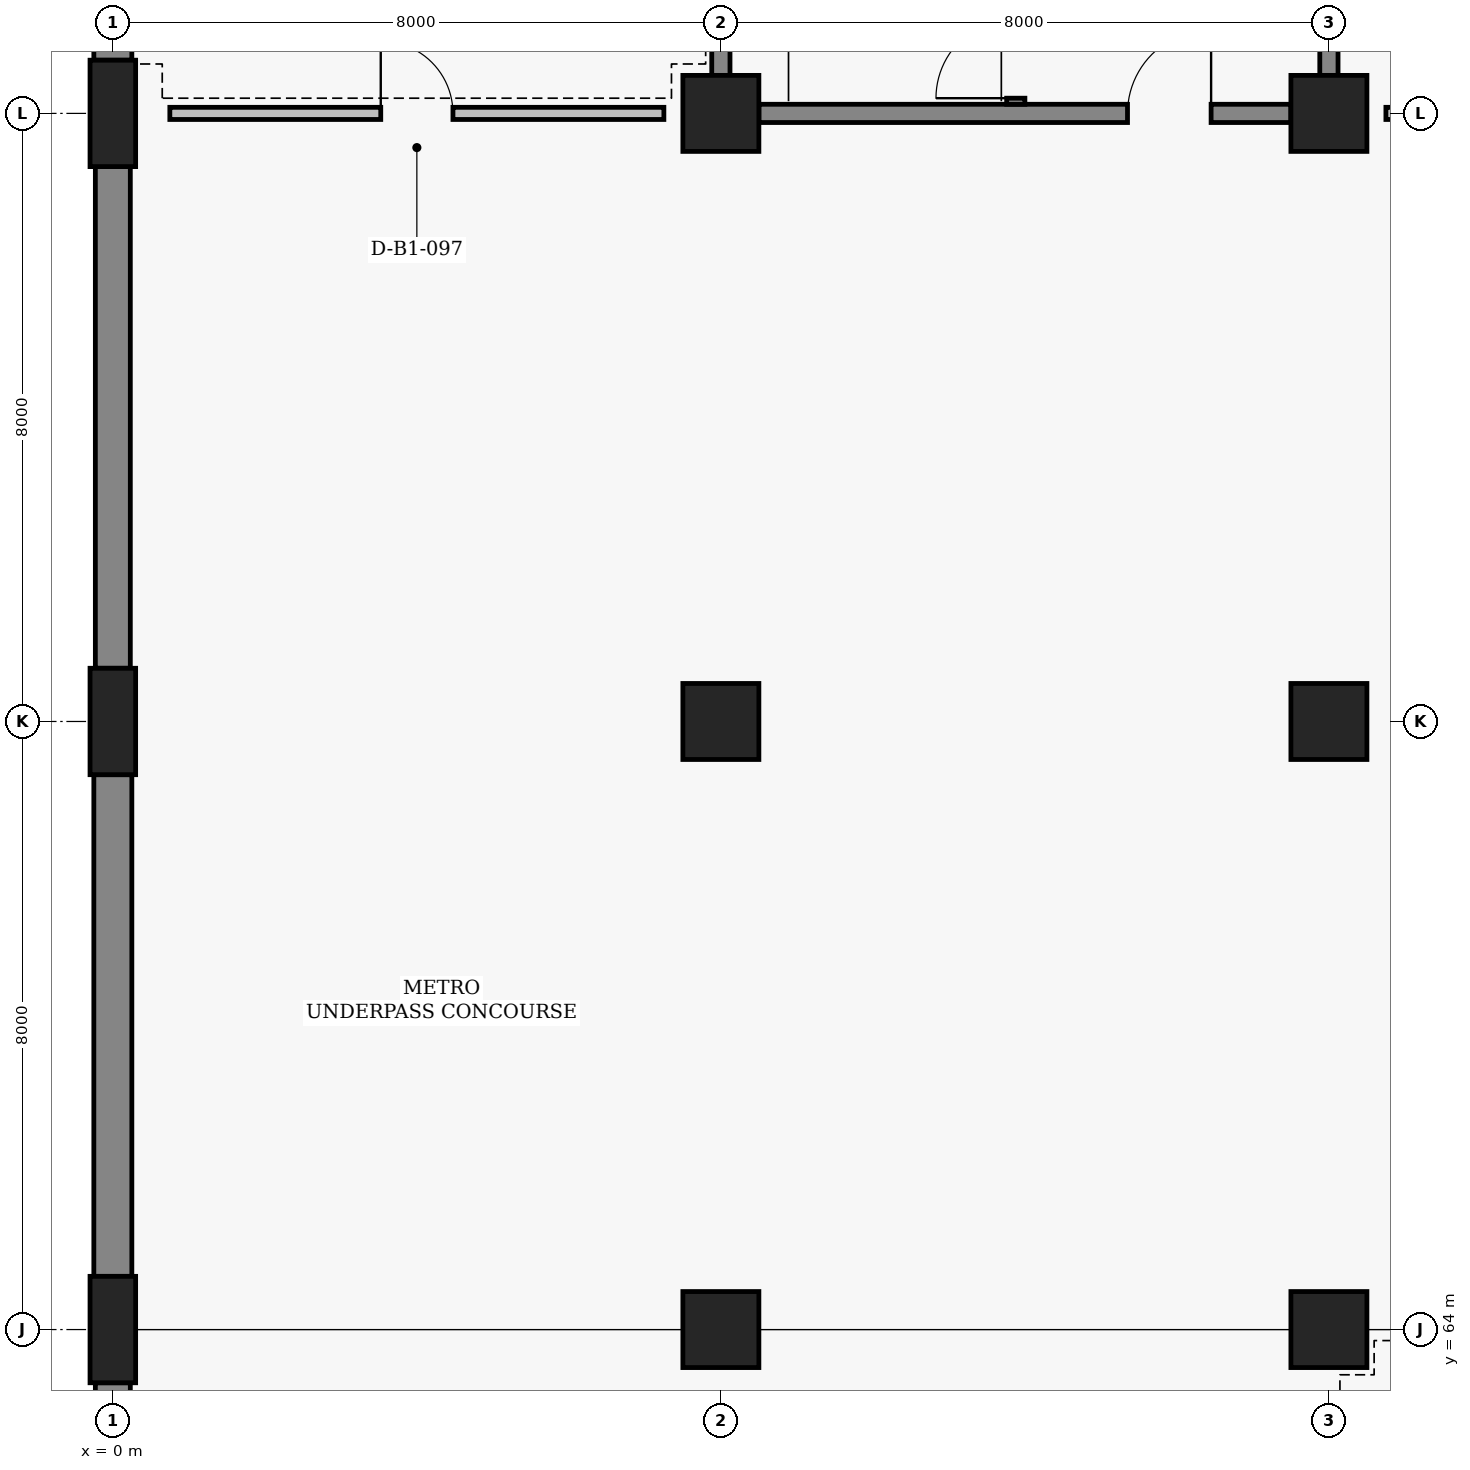
"""IFC4 building model, lengths in metres.
Left out: names, types, materials, properties, quantities, classifications, styles, units other than length and angle.
Written with IfcOpenShell. Run it as: python <this file> out.ifc"""

import sys

from ifc_helpers import new_model, si_unit, direction, frame, frame_2d, origin, origin_2d, place, context, subcontext, project, spatial, rectangle, circle, extrude, element, fill, save


model = new_model("IFC4")
c1 = context("Model", 3, precision=1e-05, world=origin(), true_north=direction((0.0, 1.0)))
c2 = subcontext(c1, "Body", "Model", "MODEL_VIEW")
j1 = project(units=[si_unit("LENGTHUNIT", "METRE"), si_unit("PLANEANGLEUNIT", "RADIAN")], contexts=[c1])
p1 = place(None, origin())
s1 = spatial("IfcSite", under=j1, at=p1, CompositionType="ELEMENT")
p2 = place(p1, origin())
s2 = spatial("IfcBuilding", under=s1, at=p2, CompositionType="ELEMENT")
p3 = place(p2, frame((0.0, 0.0, -5.4)))
s3 = spatial("IfcBuildingStorey", under=s2, at=p3, CompositionType="ELEMENT", Elevation=-5.4)
for number, where, z_axis, x_axis in (
    (1, (0.0, 64.0, 0.0), (0.0, 0.0, 1.0), (1.0, 0.0, 0.0)),
    (2, (0.0, 72.0, 0.0), (0.0, 0.0, 1.0), (1.0, 0.0, 0.0)),
    (3, (0.0, 80.0, 0.0), (0.0, 0.0, 1.0), (1.0, 0.0, 0.0)),
):
    element("IfcColumn", number, at=place(p3, frame(where, z_axis=z_axis, x_axis=x_axis)), inside=s3, PredefinedType="PILASTER", context=c2, shape_type="SweptSolid", body=[
        extrude(rectangle(XDim=0.6, YDim=1.4, at=origin_2d()), origin(), (0.0, 0.0, 1.0), 5.4),
    ])
for number, where, z_axis, x_axis in (
    (4, (8.0, 64.0, 0.0), (0.0, 0.0, 1.0), (1.0, 0.0, 0.0)),
    (5, (8.0, 72.0, 0.0), (0.0, 0.0, 1.0), (1.0, 0.0, 0.0)),
    (6, (8.0, 80.0, 0.0), (0.0, 0.0, 1.0), (1.0, 0.0, 0.0)),
    (7, (16.0, 64.0, 0.0), (0.0, 0.0, 1.0), (1.0, 0.0, 0.0)),
    (8, (16.0, 72.0, 0.0), (0.0, 0.0, 1.0), (1.0, 0.0, 0.0)),
    (9, (16.0, 80.0, 0.0), (0.0, 0.0, 1.0), (1.0, 0.0, 0.0)),
):
    element("IfcColumn", number, at=place(p3, frame(where, z_axis=z_axis, x_axis=x_axis)), inside=s3, PredefinedType="COLUMN", context=c2, shape_type="SweptSolid", body=[
        extrude(circle(Radius=0.5, at=origin_2d()), origin(), (0.0, 0.0, 1.0), 5.4),
    ])
p4 = place(p3, frame((0.0, 56.7, 0.0), z_axis=(0.0, 0.0, 1.0), x_axis=(0.0, 1.0, 0.0)))
e10 = element("IfcWall", 10, at=p4, inside=s3, PredefinedType="STANDARD", context=c2, shape_type="SweptSolid", body=[
    extrude(rectangle(XDim=6.6, YDim=0.46, at=frame_2d((3.3, 0.0))), origin(), (0.0, 0.0, 1.0), 3.69),
])
p5 = place(p3, frame((0.0, 64.7, 0.0), z_axis=(0.0, 0.0, 1.0), x_axis=(0.0, 1.0, 0.0)))
e11 = element("IfcWall", 11, at=p5, inside=s3, PredefinedType="STANDARD", context=c2, shape_type="SweptSolid", body=[
    extrude(rectangle(XDim=6.6, YDim=0.5, at=frame_2d((3.3, 0.0))), origin(), (0.0, 0.0, 1.0), 4.24),
])
p6 = place(p3, frame((0.0, 72.7, 0.0), z_axis=(0.0, 0.0, 1.0), x_axis=(0.0, 1.0, 0.0)))
e12 = element("IfcWall", 12, at=p6, inside=s3, PredefinedType="STANDARD", context=c2, shape_type="SweptSolid", body=[
    extrude(rectangle(XDim=6.6, YDim=0.46, at=frame_2d((3.3, 0.0))), origin(), (0.0, 0.0, 1.0), 4.24),
])
p7 = place(p3, frame((0.0, 80.7, 0.0), z_axis=(0.0, 0.0, 1.0), x_axis=(0.0, 1.0, 0.0)))
e13 = element("IfcWall", 13, at=p7, inside=s3, PredefinedType="STANDARD", context=c2, shape_type="SweptSolid", body=[
    extrude(rectangle(XDim=6.6, YDim=0.5, at=frame_2d((3.3, 0.0))), origin(), (0.0, 0.0, 1.0), 4.24),
])
p8 = place(p3, frame((8.5, 80.0, 0.0), z_axis=(0.0, 0.0, 1.0), x_axis=(1.0, 0.0, 0.0)))
e14 = element("IfcWall", 14, at=p8, inside=s3, PredefinedType="SHEAR", context=c2, shape_type="SweptSolid", body=[
    extrude(rectangle(XDim=7.0, YDim=0.24, at=frame_2d((3.5, 0.0))), origin(), (0.0, 0.0, 1.0), 4.39),
])
p9 = place(p8, frame((4.85, 0.0, 0.0)))
e15 = element("IfcOpeningElement", 15, at=p9, cuts=e14, PredefinedType="OPENING", context=c2, shape_type="SweptSolid", body=[
    extrude(rectangle(XDim=1.1, YDim=2.2, at=frame_2d((0.55, 1.1))), frame((0.0, 0.13, 0.0), z_axis=(0.0, -1.0, 0.0), x_axis=(1.0, 0.0, 0.0)), (0.0, 0.0, 1.0), 0.26),
])
for number, where, z_axis, x_axis in (
    (16, (8.0, 80.5, 0.0), (0.0, 0.0, 1.0), (0.0, 1.0, 0.0)),
    (17, (16.0, 80.5, 0.0), (0.0, 0.0, 1.0), (0.0, 1.0, 0.0)),
):
    element("IfcWall", number, at=place(p3, frame(where, z_axis=z_axis, x_axis=x_axis)), inside=s3, PredefinedType="SHEAR", context=c2, shape_type="SweptSolid", body=[
        extrude(rectangle(XDim=7.0, YDim=0.24, at=frame_2d((3.5, 0.0))), origin(), (0.0, 0.0, 1.0), 4.39),
    ])
p10 = place(p3, frame((11.88, 80.12, 0.0), z_axis=(0.0, 0.0, 1.0), x_axis=(0.0, 1.0, 0.0)))
e18 = element("IfcWall", 18, at=p10, inside=s3, PredefinedType="SHEAR", context=c2, shape_type="SweptSolid", body=[
    extrude(rectangle(XDim=7.76, YDim=0.24, at=frame_2d((3.88, 0.0))), origin(), (0.0, 0.0, 1.0), 4.59),
])
p11 = place(p10, frame((0.08, 0.0, 0.0)))
e19 = element("IfcOpeningElement", 19, at=p11, cuts=e18, PredefinedType="OPENING", context=c2, shape_type="SweptSolid", body=[
    extrude(rectangle(XDim=1.05, YDim=2.15, at=frame_2d((0.525, 1.075))), frame((0.0, 0.13, 0.0), z_axis=(0.0, -1.0, 0.0), x_axis=(1.0, 0.0, 0.0)), (0.0, 0.0, 1.0), 0.26),
])
p12 = place(p3, frame((0.75, 80.0, 0.0), z_axis=(0.0, 0.0, 1.0), x_axis=(1.0, 0.0, 0.0)))
e20 = element("IfcWall", 20, at=p12, inside=s3, PredefinedType="PARTITIONING", context=c2, shape_type="SweptSolid", body=[
    extrude(rectangle(XDim=6.5, YDim=0.16, at=frame_2d((3.25, 0.0))), origin(), (0.0, 0.0, 1.0), 4.49),
])
p13 = place(p12, frame((2.775, 0.0, 0.0)))
e21 = element("IfcOpeningElement", 21, at=p13, cuts=e20, PredefinedType="OPENING", context=c2, shape_type="SweptSolid", body=[
    extrude(rectangle(XDim=0.95, YDim=2.1, at=frame_2d((0.475, 1.05))), frame((0.0, 0.09, 0.0), z_axis=(0.0, -1.0, 0.0), x_axis=(1.0, 0.0, 0.0)), (0.0, 0.0, 1.0), 0.18),
])
p14 = place(p3, frame((16.75, 80.0, 0.0), z_axis=(0.0, 0.0, 1.0), x_axis=(1.0, 0.0, 0.0)))
e22 = element("IfcWall", 22, at=p14, inside=s3, PredefinedType="PARTITIONING", context=c2, shape_type="SweptSolid", body=[
    extrude(rectangle(XDim=6.5, YDim=0.16, at=frame_2d((3.25, 0.0))), origin(), (0.0, 0.0, 1.0), 4.49),
])
p15 = place(p14, frame((2.775, 0.0, 0.0)))
e23 = element("IfcOpeningElement", 23, at=p15, cuts=e22, PredefinedType="OPENING", context=c2, shape_type="SweptSolid", body=[
    extrude(rectangle(XDim=0.95, YDim=2.1, at=frame_2d((0.475, 1.05))), frame((0.0, 0.09, 0.0), z_axis=(0.0, -1.0, 0.0), x_axis=(1.0, 0.0, 0.0)), (0.0, 0.0, 1.0), 0.18),
])
p16 = place(p9, origin())
e24 = element("IfcDoor", 24, at=p16, inside=s3, OperationType="SINGLE_SWING_RIGHT", PredefinedType="DOOR", context=c2, shape_type="SweptSolid", body=[
    extrude(rectangle(XDim=1.1, YDim=2.2, at=frame_2d((0.55, 1.1))), frame((0.0, 0.025, 0.0), z_axis=(0.0, -1.0, 0.0), x_axis=(1.0, 0.0, 0.0)), (0.0, 0.0, 1.0), 0.05),
])
fill(e15, e24)
p17 = place(p11, origin())
e25 = element("IfcDoor", 25, at=p17, inside=s3, OperationType="SINGLE_SWING_LEFT", PredefinedType="DOOR", context=c2, shape_type="SweptSolid", body=[
    extrude(rectangle(XDim=1.05, YDim=2.15, at=frame_2d((0.525, 1.075))), frame((0.0, 0.025, 0.0), z_axis=(0.0, -1.0, 0.0), x_axis=(1.0, 0.0, 0.0)), (0.0, 0.0, 1.0), 0.05),
])
fill(e19, e25)
p18 = place(p13, origin())
e26 = element("IfcDoor", 26, at=p18, inside=s3, OperationType="SINGLE_SWING_LEFT", PredefinedType="DOOR", context=c2, shape_type="SweptSolid", body=[
    extrude(rectangle(XDim=0.95, YDim=2.1, at=frame_2d((0.475, 1.05))), frame((0.0, 0.025, 0.0), z_axis=(0.0, -1.0, 0.0), x_axis=(1.0, 0.0, 0.0)), (0.0, 0.0, 1.0), 0.05),
])
fill(e21, e26)
save(model, sys.argv[1])
